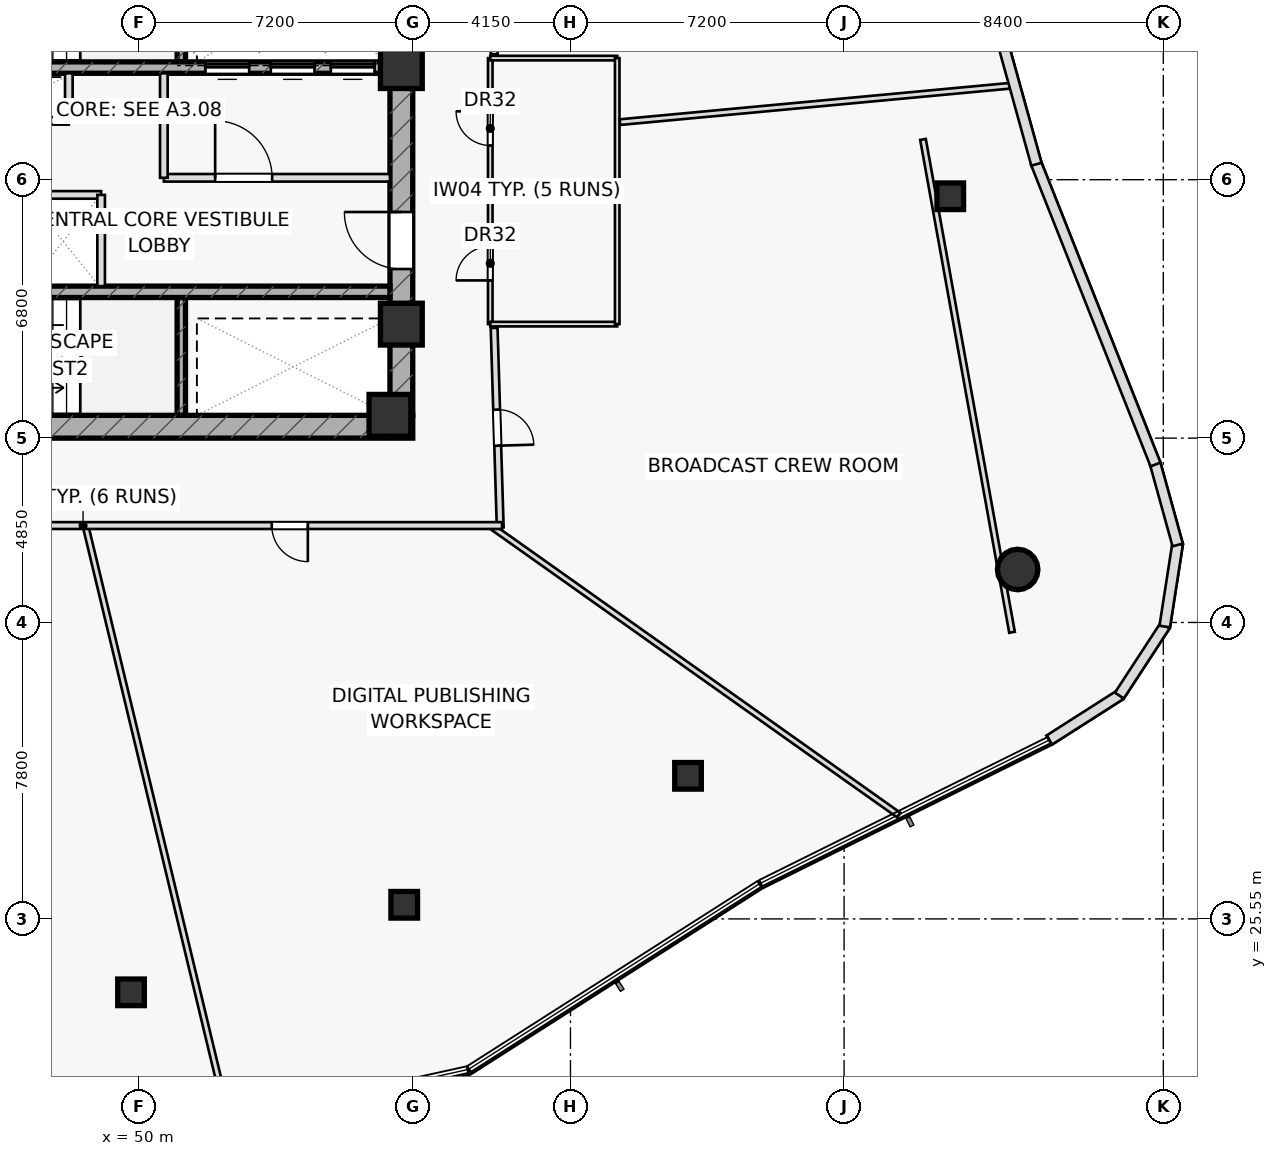
"""IFC4 building model, lengths in metres.
Left out: names, types, materials, properties, quantities, classifications, styles, units other than length and angle.
Written with IfcOpenShell. Run it as: python <this file> out.ifc"""

import sys

from ifc_helpers import new_model, si_unit, direction, frame, frame_2d, origin, origin_2d, place, context, subcontext, project, spatial, rectangle, hollow_rectangle, hollow_circle, extrude, element, fill, save


model = new_model("IFC4")
c1 = context("Model", 3, precision=1e-05, world=origin(), true_north=direction((0.0, 1.0)))
c2 = subcontext(c1, "Body", "Model", "MODEL_VIEW")
j1 = project(units=[si_unit("LENGTHUNIT", "METRE"), si_unit("PLANEANGLEUNIT", "RADIAN")], contexts=[c1])
p1 = place(None, origin())
s1 = spatial("IfcSite", under=j1, at=p1, CompositionType="ELEMENT")
p2 = place(p1, origin())
s2 = spatial("IfcBuilding", under=s1, at=p2, CompositionType="ELEMENT")
p3 = place(p2, frame((0.0, 0.0, 62.7)))
s3 = spatial("IfcBuildingStorey", under=s2, at=p3, CompositionType="ELEMENT", Elevation=62.7)
for number, where, z_axis, x_axis in (
    (1, (51.11, 48.1, 0.0), (0.0, 0.0, 1.0), (0.0, 1.0, 0.0)),
    (2, (51.11, 38.8, 0.0), (0.0, 0.0, 1.0), (0.0, 1.0, 0.0)),
):
    element("IfcWall", number, at=place(p3, frame(where, z_axis=z_axis, x_axis=x_axis)), inside=s3, PredefinedType="SHEAR", context=c2, shape_type="SweptSolid", body=[
        extrude(rectangle(XDim=3.1, YDim=0.22, at=frame_2d((1.55, 0.0))), origin(), (0.0, 0.0, 1.0), 3.6),
    ])
p4 = place(p3, frame((42.8, 38.5, 0.0), z_axis=(0.0, 0.0, 1.0), x_axis=(1.0, 0.0, 0.0)))
e3 = element("IfcWall", 3, at=p4, inside=s3, PredefinedType="SHEAR", context=c2, shape_type="SweptSolid", body=[
    extrude(rectangle(XDim=14.4, YDim=0.6, at=frame_2d((7.2, 0.0))), origin(), (0.0, 0.0, 1.0), 3.6),
])
p5 = place(p4, frame((0.88, 0.0, 0.0)))
e4 = element("IfcOpeningElement", 4, at=p5, cuts=e3, PredefinedType="OPENING", context=c2, shape_type="SweptSolid", body=[
    extrude(rectangle(XDim=1.05, YDim=2.2, at=frame_2d((0.525, 1.1))), frame((0.0, 0.31, 0.0), z_axis=(0.0, -1.0, 0.0), x_axis=(1.0, 0.0, 0.0)), (0.0, 0.0, 1.0), 0.62),
])
p6 = place(p3, frame((56.9, 38.8, 0.0), z_axis=(0.0, 0.0, 1.0), x_axis=(0.0, 1.0, 0.0)))
e5 = element("IfcWall", 5, at=p6, inside=s3, PredefinedType="SHEAR", context=c2, shape_type="SweptSolid", body=[
    extrude(rectangle(XDim=12.4, YDim=0.6, at=frame_2d((6.2, 0.0))), origin(), (0.0, 0.0, 1.0), 3.6),
])
p7 = place(p6, frame((3.85, 0.0, 0.0)))
e6 = element("IfcOpeningElement", 6, at=p7, cuts=e5, PredefinedType="OPENING", context=c2, shape_type="SweptSolid", body=[
    extrude(rectangle(XDim=1.5, YDim=2.2, at=frame_2d((0.75, 1.1))), frame((0.0, 0.31, 0.0), z_axis=(0.0, -1.0, 0.0), x_axis=(1.0, 0.0, 0.0)), (0.0, 0.0, 1.0), 0.62),
])
p8 = place(p3, frame((43.4, 47.95, 0.0), z_axis=(0.0, 0.0, 1.0), x_axis=(1.0, 0.0, 0.0)))
e7 = element("IfcWall", 7, at=p8, inside=s3, PredefinedType="SHEAR", context=c2, shape_type="SweptSolid", body=[
    extrude(rectangle(XDim=13.2, YDim=0.3, at=frame_2d((6.6, 0.0))), origin(), (0.0, 0.0, 1.0), 3.6),
])
p9 = place(p8, frame((8.345, 0.0, 0.0)))
e8 = element("IfcOpeningElement", 8, at=p9, cuts=e7, PredefinedType="OPENING", context=c2, shape_type="SweptSolid", body=[
    extrude(rectangle(XDim=1.15, YDim=2.2, at=frame_2d((0.575, 1.1))), frame((0.0, 0.16, 0.0), z_axis=(0.0, -1.0, 0.0), x_axis=(1.0, 0.0, 0.0)), (0.0, 0.0, 1.0), 0.32),
])
p10 = place(p8, frame((10.065, 0.0, 0.0)))
e9 = element("IfcOpeningElement", 9, at=p10, cuts=e7, PredefinedType="OPENING", context=c2, shape_type="SweptSolid", body=[
    extrude(rectangle(XDim=1.15, YDim=2.2, at=frame_2d((0.575, 1.1))), frame((0.0, 0.16, 0.0), z_axis=(0.0, -1.0, 0.0), x_axis=(1.0, 0.0, 0.0)), (0.0, 0.0, 1.0), 0.32),
])
p11 = place(p8, frame((11.645, 0.0, 0.0)))
e10 = element("IfcOpeningElement", 10, at=p11, cuts=e7, PredefinedType="OPENING", context=c2, shape_type="SweptSolid", body=[
    extrude(rectangle(XDim=1.15, YDim=2.2, at=frame_2d((0.575, 1.1))), frame((0.0, 0.16, 0.0), z_axis=(0.0, -1.0, 0.0), x_axis=(1.0, 0.0, 0.0)), (0.0, 0.0, 1.0), 0.32),
])
p12 = place(p3, frame((43.4, 42.05, 0.0), z_axis=(0.0, 0.0, 1.0), x_axis=(1.0, 0.0, 0.0)))
e11 = element("IfcWall", 11, at=p12, inside=s3, PredefinedType="SHEAR", context=c2, shape_type="SweptSolid", body=[
    extrude(rectangle(XDim=13.2, YDim=0.3, at=frame_2d((6.6, 0.0))), origin(), (0.0, 0.0, 1.0), 3.6),
])
for number, where, z_axis, x_axis in (
    (12, (56.9, 47.95, 0.0), (0.0, 0.0, 1.0), (1.0, 0.0, 0.0)),
    (13, (56.9, 41.2, 0.0), (0.0, 0.0, 1.0), (1.0, 0.0, 0.0)),
    (14, (56.6, 38.8, 0.0), (0.0, 0.0, 1.0), (1.0, 0.0, 0.0)),
):
    element("IfcColumn", number, at=place(p3, frame(where, z_axis=z_axis, x_axis=x_axis)), inside=s3, PredefinedType="COLUMN", context=c2, shape_type="SweptSolid", body=[
        extrude(rectangle(XDim=1.1, YDim=1.1, at=origin_2d()), origin(), (0.0, 0.0, 1.0), 3.6),
    ])
for number, where, z_axis, x_axis in (
    (15, (49.787, 23.618, 0.0), (0.0, 0.0, 1.0), (1.0, 0.0, 0.0)),
    (16, (56.975, 25.921, 0.0), (0.0, 0.0, 1.0), (1.0, 0.0, 0.0)),
    (17, (64.444, 29.315, 0.0), (0.0, 0.0, 1.0), (1.0, 0.0, 0.0)),
):
    element("IfcColumn", number, at=place(p3, frame(where, z_axis=z_axis, x_axis=x_axis)), inside=s3, PredefinedType="COLUMN", context=c2, shape_type="SweptSolid", body=[
        extrude(hollow_rectangle(XDim=0.7, YDim=0.7, WallThickness=0.04, at=origin_2d()), origin(), (0.0, 0.0, 1.0), 3.6),
    ])
p13 = place(p3, frame((73.118, 34.744, 0.0), z_axis=(0.0, 0.0, 1.0), x_axis=(1.0, 0.0, 0.0)))
e18 = element("IfcColumn", 18, at=p13, inside=s3, PredefinedType="COLUMN", context=c2, shape_type="SweptSolid", body=[
    extrude(hollow_circle(Radius=0.533, WallThickness=0.045, at=origin_2d()), origin(), (0.0, 0.0, 1.0), 3.6),
])
p14 = place(p3, frame((71.344, 44.565, 0.0), z_axis=(0.0, 0.0, 1.0), x_axis=(1.0, 0.0, 0.0)))
e19 = element("IfcColumn", 19, at=p14, inside=s3, PredefinedType="COLUMN", context=c2, shape_type="SweptSolid", body=[
    extrude(hollow_rectangle(XDim=0.7, YDim=0.7, WallThickness=0.04, at=origin_2d()), origin(), (0.0, 0.0, 1.0), 3.6),
])
p15 = place(p3, frame((45.75, 46.55, 0.0), z_axis=(0.0, 0.0, 1.0), x_axis=(1.0, 0.0, 0.0)))
e20 = element("IfcWall", 20, at=p15, inside=s3, PredefinedType="PARTITIONING", context=c2, shape_type="SweptSolid", body=[
    extrude(rectangle(XDim=2.4, YDim=0.2, at=frame_2d((1.2, 0.0))), origin(), (0.0, 0.0, 1.0), 3.6),
])
p16 = place(p3, frame((48.15, 46.55, 0.0), z_axis=(0.0, 0.0, 1.0), x_axis=(0.0, 1.0, 0.0)))
e21 = element("IfcWall", 21, at=p16, inside=s3, PredefinedType="PARTITIONING", context=c2, shape_type="SweptSolid", body=[
    extrude(rectangle(XDim=1.25, YDim=0.2, at=frame_2d((0.625, 0.0))), origin(), (0.0, 0.0, 1.0), 3.6),
])
p17 = place(p3, frame((46.95, 44.6, 0.0), z_axis=(0.0, 0.0, 1.0), x_axis=(1.0, 0.0, 0.0)))
e22 = element("IfcWall", 22, at=p17, inside=s3, PredefinedType="PARTITIONING", context=c2, shape_type="SweptSolid", body=[
    extrude(rectangle(XDim=2.05, YDim=0.2, at=frame_2d((1.025, 0.0))), origin(), (0.0, 0.0, 1.0), 3.6),
])
p18 = place(p3, frame((50.65, 45.05, 0.0), z_axis=(0.0, 0.0, 1.0), x_axis=(1.0, 0.0, 0.0)))
e23 = element("IfcWall", 23, at=p18, inside=s3, PredefinedType="PARTITIONING", context=c2, shape_type="SweptSolid", body=[
    extrude(rectangle(XDim=5.95, YDim=0.2, at=frame_2d((2.975, 0.0))), origin(), (0.0, 0.0, 1.0), 3.6),
])
p19 = place(p18, frame((1.35, 0.0, 0.0)))
e24 = element("IfcOpeningElement", 24, at=p19, cuts=e23, PredefinedType="OPENING", context=c2, shape_type="SweptSolid", body=[
    extrude(rectangle(XDim=1.5, YDim=2.2, at=frame_2d((0.75, 1.1))), frame((0.0, 0.11, 0.0), z_axis=(0.0, -1.0, 0.0), x_axis=(1.0, 0.0, 0.0)), (0.0, 0.0, 1.0), 0.22),
])
p20 = place(p3, frame((50.65, 45.05, 0.0), z_axis=(0.0, 0.0, 1.0), x_axis=(0.0, 1.0, 0.0)))
e25 = element("IfcWall", 25, at=p20, inside=s3, PredefinedType="PARTITIONING", context=c2, shape_type="SweptSolid", body=[
    extrude(rectangle(XDim=2.75, YDim=0.2, at=frame_2d((1.375, 0.0))), origin(), (0.0, 0.0, 1.0), 3.6),
])
p21 = place(p3, frame((72.969, 33.091, 0.0), z_axis=(0.0, 0.0, 1.0), x_axis=(-0.177742578179, 0.984077017261, 0.0)))
e26 = element("IfcWall", 26, at=p21, inside=s3, PredefinedType="PARTITIONING", context=c2, shape_type="SweptSolid", body=[
    extrude(rectangle(XDim=13.179, YDim=0.15, at=frame_2d((6.59, 0.0))), origin(), (0.0, 0.0, 1.0), 2.975),
])
p22 = place(p3, frame((59.24, 41.2, 0.0), z_axis=(0.0, 0.0, 1.0), x_axis=(0.0, 1.0, 0.0)))
e27 = element("IfcWall", 27, at=p22, inside=s3, PredefinedType="PARTITIONING", context=c2, shape_type="SweptSolid", body=[
    extrude(rectangle(XDim=7.0, YDim=0.12, at=frame_2d((3.5, 0.0))), origin(), (0.0, 0.0, 1.0), 3.6),
])
p23 = place(p22, frame((1.15, 0.0, 0.0)))
e28 = element("IfcOpeningElement", 28, at=p23, cuts=e27, PredefinedType="OPENING", context=c2, shape_type="SweptSolid", body=[
    extrude(rectangle(XDim=0.9, YDim=2.05, at=frame_2d((0.45, 1.025))), frame((0.0, 0.07, 0.0), z_axis=(0.0, -1.0, 0.0), x_axis=(1.0, 0.0, 0.0)), (0.0, 0.0, 1.0), 0.14),
])
p24 = place(p22, frame((4.7, 0.0, 0.0)))
e29 = element("IfcOpeningElement", 29, at=p24, cuts=e27, PredefinedType="OPENING", context=c2, shape_type="SweptSolid", body=[
    extrude(rectangle(XDim=0.9, YDim=2.05, at=frame_2d((0.45, 1.025))), frame((0.0, 0.07, 0.0), z_axis=(0.0, -1.0, 0.0), x_axis=(1.0, 0.0, 0.0)), (0.0, 0.0, 1.0), 0.14),
])
p25 = place(p3, frame((59.24, 41.2, 0.0), z_axis=(0.0, 0.0, 1.0), x_axis=(1.0, 0.0, 0.0)))
e30 = element("IfcWall", 30, at=p25, inside=s3, PredefinedType="PARTITIONING", context=c2, shape_type="SweptSolid", body=[
    extrude(rectangle(XDim=3.34, YDim=0.12, at=frame_2d((1.67, 0.0))), origin(), (0.0, 0.0, 1.0), 2.975),
])
for number, where, z_axis, x_axis in (
    (31, (59.24, 44.65, 0.0), (0.0, 0.0, 1.0), (1.0, 0.0, 0.0)),
    (32, (59.24, 48.2, 0.0), (0.0, 0.0, 1.0), (1.0, 0.0, 0.0)),
):
    element("IfcWall", number, at=place(p3, frame(where, z_axis=z_axis, x_axis=x_axis)), inside=s3, PredefinedType="PARTITIONING", context=c2, shape_type="SweptSolid", body=[
        extrude(rectangle(XDim=3.34, YDim=0.12, at=frame_2d((1.67, 0.0))), origin(), (0.0, 0.0, 1.0), 3.6),
    ])
p26 = place(p3, frame((62.58, 41.2, 0.0), z_axis=(0.0, 0.0, 1.0), x_axis=(0.0, 1.0, 0.0)))
e33 = element("IfcWall", 33, at=p26, inside=s3, PredefinedType="PARTITIONING", context=c2, shape_type="SweptSolid", body=[
    extrude(rectangle(XDim=7.0, YDim=0.12, at=frame_2d((3.5, 0.0))), origin(), (0.0, 0.0, 1.0), 3.6),
])
p27 = place(p3, frame((48.588, 35.9, 0.0), z_axis=(0.0, 0.0, 1.0), x_axis=(0.233735732541, -0.972300163187, 0.0)))
e34 = element("IfcWall", 34, at=p27, inside=s3, PredefinedType="PARTITIONING", context=c2, shape_type="SweptSolid", body=[
    extrude(rectangle(XDim=16.162, YDim=0.15, at=frame_2d((8.081, 0.0))), origin(), (0.0, 0.0, 1.0), 3.025),
])
p28 = place(p3, frame((59.24, 35.9, 0.0), z_axis=(0.0, 0.0, 1.0), x_axis=(0.815883884658, -0.578215778716, 0.0)))
e35 = element("IfcWall", 35, at=p28, inside=s3, PredefinedType="PARTITIONING", context=c2, shape_type="SweptSolid", body=[
    extrude(rectangle(XDim=13.175, YDim=0.15, at=frame_2d((6.588, 0.0))), origin(), (0.0, 0.0, 1.0), 2.975),
])
p29 = place(p3, frame((62.65, 46.515, 0.0), z_axis=(0.0, 0.0, 1.0), x_axis=(0.995682440143, 0.092824987962, 0.0)))
e36 = element("IfcWall", 36, at=p29, inside=s3, PredefinedType="PARTITIONING", context=c2, shape_type="SweptSolid", body=[
    extrude(rectangle(XDim=10.442, YDim=0.15, at=frame_2d((5.221, 0.0))), origin(), (0.0, 0.0, 1.0), 3.025),
])
p30 = place(p3, frame((59.501, 54.15, 0.0), z_axis=(0.0, 0.0, 1.0), x_axis=(-0.027367567602, -0.999625437973, 0.0)))
e37 = element("IfcWall", 37, at=p30, inside=s3, PredefinedType="PARTITIONING", context=c2, shape_type="SweptSolid", body=[
    extrude(rectangle(XDim=5.852, YDim=0.18, at=frame_2d((2.926, 0.0))), origin(), (0.0, 0.0, 1.0), 2.975),
])
p31 = place(p30, frame((2.451, 0.0, 0.0)))
e38 = element("IfcOpeningElement", 38, at=p31, cuts=e37, PredefinedType="OPENING", context=c2, shape_type="SweptSolid", body=[
    extrude(rectangle(XDim=0.95, YDim=2.05, at=frame_2d((0.475, 1.025))), frame((0.0, 0.1, 0.0), z_axis=(0.0, -1.0, 0.0), x_axis=(1.0, 0.0, 0.0)), (0.0, 0.0, 1.0), 0.2),
])
p32 = place(p3, frame((59.342, 41.1, 0.0), z_axis=(0.0, 0.0, 1.0), x_axis=(0.030445329425, -0.999536433511, 0.0)))
e39 = element("IfcWall", 39, at=p32, inside=s3, PredefinedType="PARTITIONING", context=c2, shape_type="SweptSolid", body=[
    extrude(rectangle(XDim=5.252, YDim=0.18, at=frame_2d((2.626, 0.0))), origin(), (0.0, 0.0, 1.0), 2.975),
])
p33 = place(p32, frame((2.151, 0.0, 0.0)))
e40 = element("IfcOpeningElement", 40, at=p33, cuts=e39, PredefinedType="OPENING", context=c2, shape_type="SweptSolid", body=[
    extrude(rectangle(XDim=0.95, YDim=2.05, at=frame_2d((0.475, 1.025))), frame((0.0, 0.1, 0.0), z_axis=(0.0, -1.0, 0.0), x_axis=(1.0, 0.0, 0.0)), (0.0, 0.0, 1.0), 0.2),
])
p34 = place(p3, frame((59.55, 35.9, 0.0), z_axis=(0.0, 0.0, 1.0), x_axis=(-1.0, 0.0, 0.0)))
e41 = element("IfcWall", 41, at=p34, inside=s3, PredefinedType="PARTITIONING", context=c2, shape_type="SweptSolid", body=[
    extrude(rectangle(XDim=22.05, YDim=0.18, at=frame_2d((11.025, 0.0))), origin(), (0.0, 0.0, 1.0), 2.975),
])
p35 = place(p34, frame((5.11, 0.0, 0.0)))
e42 = element("IfcOpeningElement", 42, at=p35, cuts=e41, PredefinedType="OPENING", context=c2, shape_type="SweptSolid", body=[
    extrude(rectangle(XDim=0.95, YDim=2.05, at=frame_2d((0.475, 1.025))), frame((0.0, 0.1, 0.0), z_axis=(0.0, -1.0, 0.0), x_axis=(1.0, 0.0, 0.0)), (0.0, 0.0, 1.0), 0.2),
])
p36 = place(p34, frame((15.55, 0.0, 0.0)))
e43 = element("IfcOpeningElement", 43, at=p36, cuts=e41, PredefinedType="OPENING", context=c2, shape_type="SweptSolid", body=[
    extrude(rectangle(XDim=0.95, YDim=2.05, at=frame_2d((0.475, 1.025))), frame((0.0, 0.1, 0.0), z_axis=(0.0, -1.0, 0.0), x_axis=(1.0, 0.0, 0.0)), (0.0, 0.0, 1.0), 0.2),
])
p37 = place(p3, frame((73.948, 30.255, 0.0), z_axis=(0.0, 0.0, 1.0), x_axis=(0.842911570309, 0.538052120746, 0.0)))
e44 = element("IfcWall", 44, at=p37, inside=s3, PredefinedType="STANDARD", context=c2, shape_type="SweptSolid", body=[
    extrude(rectangle(XDim=2.214, YDim=0.28, at=frame_2d((1.107, 0.0))), origin(), (0.0, 0.0, 1.0), 3.6),
])
p38 = place(p3, frame((75.794, 31.426, 0.0), z_axis=(0.0, 0.0, 1.0), x_axis=(0.546720718909, 0.837315027642, 0.0)))
e45 = element("IfcWall", 45, at=p38, inside=s3, PredefinedType="STANDARD", context=c2, shape_type="SweptSolid", body=[
    extrude(rectangle(XDim=2.203, YDim=0.28, at=frame_2d((1.102, 0.0))), origin(), (0.0, 0.0, 1.0), 3.6),
])
p39 = place(p3, frame((76.988, 33.243, 0.0), z_axis=(0.0, 0.0, 1.0), x_axis=(0.153839269679, 0.988095885582, 0.0)))
e46 = element("IfcWall", 46, at=p39, inside=s3, PredefinedType="STANDARD", context=c2, shape_type="SweptSolid", body=[
    extrude(rectangle(XDim=2.203, YDim=0.28, at=frame_2d((1.101, 0.0))), origin(), (0.0, 0.0, 1.0), 3.6),
])
p40 = place(p3, frame((77.328, 35.39, 0.0), z_axis=(0.0, 0.0, 1.0), x_axis=(-0.266393052341, 0.963864483039, 0.0)))
e47 = element("IfcWall", 47, at=p40, inside=s3, PredefinedType="STANDARD", context=c2, shape_type="SweptSolid", body=[
    extrude(rectangle(XDim=2.225, YDim=0.28, at=frame_2d((1.113, 0.0))), origin(), (0.0, 0.0, 1.0), 3.6),
])
p41 = place(p3, frame((76.745, 37.507, 0.0), z_axis=(0.0, 0.0, 1.0), x_axis=(-0.368496930079, 0.929628964976, 0.0)))
e48 = element("IfcWall", 48, at=p41, inside=s3, PredefinedType="STANDARD", context=c2, shape_type="SweptSolid", body=[
    extrude(rectangle(XDim=8.53, YDim=0.28, at=frame_2d((4.265, 0.0))), origin(), (0.0, 0.0, 1.0), 3.6),
])
p42 = place(p3, frame((73.611, 45.407, 0.0), z_axis=(0.0, 0.0, 1.0), x_axis=(-0.266889795183, 0.963727055357, 0.0)))
e49 = element("IfcWall", 49, at=p42, inside=s3, PredefinedType="STANDARD", context=c2, shape_type="SweptSolid", body=[
    extrude(rectangle(XDim=9.118, YDim=0.28, at=frame_2d((4.559, 0.0))), origin(), (0.0, 0.0, 1.0), 3.6),
])
p43 = place(p3, frame((49.0, 42.2, 0.0), z_axis=(0.0, 0.0, 1.0), x_axis=(0.0, 1.0, 0.0)))
e50 = element("IfcWall", 50, at=p43, inside=s3, PredefinedType="PARTITIONING", context=c2, shape_type="SweptSolid", body=[
    extrude(rectangle(XDim=2.4, YDim=0.2, at=frame_2d((1.2, 0.0))), origin(), (0.0, 0.0, 1.0), 3.6),
])
p44 = place(p7, origin())
e51 = element("IfcDoor", 51, at=p44, inside=s3, OperationType="SINGLE_SWING_RIGHT", PredefinedType="DOOR", context=c2, shape_type="SweptSolid", body=[
    extrude(rectangle(XDim=1.5, YDim=2.2, at=frame_2d((0.75, 1.1))), frame((0.0, 0.025, 0.0), z_axis=(0.0, -1.0, 0.0), x_axis=(1.0, 0.0, 0.0)), (0.0, 0.0, 1.0), 0.05),
])
fill(e6, e51)
p45 = place(p19, origin())
e52 = element("IfcDoor", 52, at=p45, inside=s3, OperationType="SINGLE_SWING_LEFT", PredefinedType="DOOR", context=c2, shape_type="SweptSolid", body=[
    extrude(rectangle(XDim=1.5, YDim=2.2, at=frame_2d((0.75, 1.1))), frame((0.0, 0.025, 0.0), z_axis=(0.0, -1.0, 0.0), x_axis=(1.0, 0.0, 0.0)), (0.0, 0.0, 1.0), 0.05),
])
fill(e24, e52)
p46 = place(p23, origin())
e53 = element("IfcDoor", 53, at=p46, inside=s3, OperationType="SINGLE_SWING_LEFT", PredefinedType="DOOR", context=c2, shape_type="SweptSolid", body=[
    extrude(rectangle(XDim=0.9, YDim=2.05, at=frame_2d((0.45, 1.025))), frame((0.0, 0.025, 0.0), z_axis=(0.0, -1.0, 0.0), x_axis=(1.0, 0.0, 0.0)), (0.0, 0.0, 1.0), 0.05),
])
fill(e28, e53)
p47 = place(p24, origin())
e54 = element("IfcDoor", 54, at=p47, inside=s3, OperationType="SINGLE_SWING_RIGHT", PredefinedType="DOOR", context=c2, shape_type="SweptSolid", body=[
    extrude(rectangle(XDim=0.9, YDim=2.05, at=frame_2d((0.45, 1.025))), frame((0.0, 0.025, 0.0), z_axis=(0.0, -1.0, 0.0), x_axis=(1.0, 0.0, 0.0)), (0.0, 0.0, 1.0), 0.05),
])
fill(e29, e54)
p48 = place(p33, origin())
e55 = element("IfcDoor", 55, at=p48, inside=s3, OperationType="SINGLE_SWING_RIGHT", PredefinedType="DOOR", context=c2, shape_type="SweptSolid", body=[
    extrude(rectangle(XDim=0.95, YDim=2.05, at=frame_2d((0.475, 1.025))), frame((0.0, 0.025, 0.0), z_axis=(0.0, -1.0, 0.0), x_axis=(1.0, 0.0, 0.0)), (0.0, 0.0, 1.0), 0.05),
])
fill(e40, e55)
p49 = place(p35, origin())
e56 = element("IfcDoor", 56, at=p49, inside=s3, OperationType="SINGLE_SWING_LEFT", PredefinedType="DOOR", context=c2, shape_type="SweptSolid", body=[
    extrude(rectangle(XDim=0.95, YDim=2.05, at=frame_2d((0.475, 1.025))), frame((0.0, 0.025, 0.0), z_axis=(0.0, -1.0, 0.0), x_axis=(1.0, 0.0, 0.0)), (0.0, 0.0, 1.0), 0.05),
])
fill(e42, e56)
p50 = place(p9, origin())
e57 = element("IfcDoor", 57, at=p50, inside=s3, OperationType="SLIDING_TO_LEFT", PredefinedType="DOOR", context=c2, shape_type="SweptSolid", body=[
    extrude(rectangle(XDim=1.15, YDim=2.2, at=frame_2d((0.575, 1.1))), frame((0.0, 0.025, 0.0), z_axis=(0.0, -1.0, 0.0), x_axis=(1.0, 0.0, 0.0)), (0.0, 0.0, 1.0), 0.05),
])
fill(e8, e57)
p51 = place(p10, origin())
e58 = element("IfcDoor", 58, at=p51, inside=s3, OperationType="SLIDING_TO_LEFT", PredefinedType="DOOR", context=c2, shape_type="SweptSolid", body=[
    extrude(rectangle(XDim=1.15, YDim=2.2, at=frame_2d((0.575, 1.1))), frame((0.0, 0.025, 0.0), z_axis=(0.0, -1.0, 0.0), x_axis=(1.0, 0.0, 0.0)), (0.0, 0.0, 1.0), 0.05),
])
fill(e9, e58)
p52 = place(p11, origin())
e59 = element("IfcDoor", 59, at=p52, inside=s3, OperationType="SLIDING_TO_LEFT", PredefinedType="DOOR", context=c2, shape_type="SweptSolid", body=[
    extrude(rectangle(XDim=1.15, YDim=2.2, at=frame_2d((0.575, 1.1))), frame((0.0, 0.025, 0.0), z_axis=(0.0, -1.0, 0.0), x_axis=(1.0, 0.0, 0.0)), (0.0, 0.0, 1.0), 0.05),
])
fill(e10, e59)
save(model, sys.argv[1])
